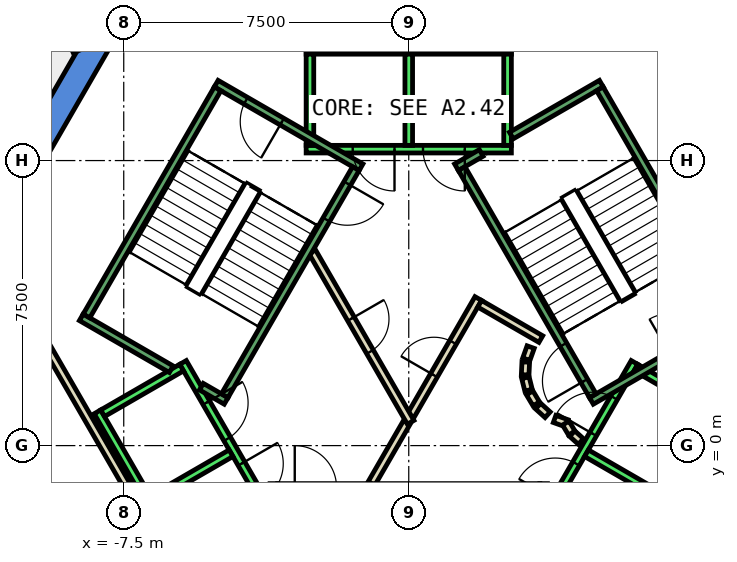
"""IFC4 building model, lengths in metres.
Left out: names, types, materials, properties, quantities, classifications, styles, units other than length and angle.
Written with IfcOpenShell. Run it as: python <this file> out.ifc"""

import sys

from ifc_helpers import new_model, si_unit, direction, frame, frame_2d, origin, place, context, subcontext, project, spatial, polyline, rectangle, outline, extrude, element, fill, save


model = new_model("IFC4")
c1 = context("Model", 3, precision=1e-05, world=origin(), true_north=direction((0.0, 1.0)))
c2 = subcontext(c1, "Body", "Model", "MODEL_VIEW")
j1 = project(units=[si_unit("LENGTHUNIT", "METRE"), si_unit("PLANEANGLEUNIT", "RADIAN")], contexts=[c1])
p1 = place(None, origin())
s1 = spatial("IfcSite", under=j1, at=p1, CompositionType="ELEMENT")
p2 = place(p1, origin())
s2 = spatial("IfcBuilding", under=s1, at=p2, CompositionType="ELEMENT")
p3 = place(p2, frame((0.0, 0.0, 206.6)))
s3 = spatial("IfcBuildingStorey", under=s2, at=p3, CompositionType="ELEMENT", Elevation=206.6)
p4 = place(p3, frame((0.0, 0.0, -0.4)))
e1 = element("IfcWall", 1, at=p4, inside=s3, PredefinedType="SHEAR", context=c2, shape_type="SweptSolid", body=[
    extrude(outline(polyline([(-11.834, 5.002), (-11.228, 4.652), (-6.235, 13.3), (-6.64, 14.0), (-11.834, 5.002)])), origin(), (0.0, 0.0, 1.0), 4.2),
])
p5 = place(p3, frame((0.0, 0.0, -0.4)))
e2 = element("IfcWall", 2, at=p5, inside=s3, PredefinedType="SHEAR", context=c2, shape_type="SweptSolid", body=[
    extrude(outline(polyline([(-13.279, 2.5), (-6.64, -9.0), (-6.235, -8.3), (-12.471, 2.5), (-13.279, 2.5)])), origin(), (0.0, 0.0, 1.0), 4.2),
])
p6 = place(p3, frame((0.0, 0.0, -0.4)))
e3 = element("IfcWall", 3, at=p6, inside=s3, PredefinedType="SHEAR", context=c2, shape_type="SweptSolid", body=[
    extrude(outline(polyline([(6.64, -9.0), (13.279, 2.5), (12.471, 2.5), (6.235, -8.3), (6.64, -9.0)])), origin(), (0.0, 0.0, 1.0), 4.2),
])
p7 = place(p3, frame((-9.47, 12.033, 0.0), z_axis=(0.0, 0.0, 1.0), x_axis=(0.40441741061, -0.914574522931, 0.0)))
e4 = element("IfcWall", 4, at=p7, inside=s3, PredefinedType="PARTITIONING", context=c2, shape_type="SweptSolid", body=[
    extrude(rectangle(XDim=1.817, YDim=0.2, at=frame_2d((0.909, 0.0))), origin(), (0.0, 0.0, 1.0), 3.8),
])
p8 = place(p3, frame((5.751, -3.938, 0.0), z_axis=(0.0, 0.0, 1.0), x_axis=(0.500034260056, 0.866005622828, 0.0)))
e5 = element("IfcWall", 5, at=p8, inside=s3, PredefinedType="PARTITIONING", context=c2, shape_type="SweptSolid", body=[
    extrude(rectangle(XDim=5.399, YDim=0.2, at=frame_2d((2.7, 0.0))), origin(), (0.0, 0.0, 1.0), 3.8),
])
p9 = place(p3, frame((-9.751, 2.99, 0.0), z_axis=(0.0, 0.0, 1.0), x_axis=(0.500012163284, -0.866018381195, 0.0)))
e6 = element("IfcWall", 6, at=p9, inside=s3, PredefinedType="PARTITIONING", context=c2, shape_type="SweptSolid", body=[
    extrude(rectangle(XDim=8.0, YDim=0.2, at=frame_2d((4.0, 0.0))), origin(), (0.0, 0.0, 1.0), 3.8),
])
p10 = place(p3, frame((-0.982, -1.0, 0.0), z_axis=(0.0, 0.0, 1.0), x_axis=(0.50024047865, 0.865886518847, 0.0)))
e7 = element("IfcWall", 7, at=p10, inside=s3, PredefinedType="PARTITIONING", context=c2, shape_type="SweptSolid", body=[
    extrude(rectangle(XDim=1.863, YDim=0.2, at=frame_2d((0.931, 0.0))), origin(), (0.0, 0.0, 1.0), 3.8),
])
p11 = place(p3, frame((0.05, 0.787, 0.0), z_axis=(0.0, 0.0, 1.0), x_axis=(0.499954076797, 0.866051915934, 0.0)))
e8 = element("IfcWall", 8, at=p11, inside=s3, PredefinedType="PARTITIONING", context=c2, shape_type="SweptSolid", body=[
    extrude(rectangle(XDim=3.558, YDim=0.2, at=frame_2d((1.779, 0.0))), origin(), (0.0, 0.0, 1.0), 3.8),
])
p12 = place(p11, frame((1.229, 0.0, 0.0)))
e9 = element("IfcOpeningElement", 9, at=p12, cuts=e8, PredefinedType="OPENING", context=c2, shape_type="SweptSolid", body=[
    extrude(rectangle(XDim=1.0, YDim=2.1, at=frame_2d((0.5, 1.05))), frame((0.0, 0.11, 0.0), z_axis=(0.0, -1.0, 0.0), x_axis=(1.0, 0.0, 0.0)), (0.0, 0.0, 1.0), 0.22),
])
p13 = place(p3, frame((1.866, 3.732, 0.0), z_axis=(0.0, 0.0, 1.0), x_axis=(0.866043361281, -0.499968895414, 0.0)))
e10 = element("IfcWall", 10, at=p13, inside=s3, PredefinedType="PARTITIONING", context=c2, shape_type="SweptSolid", body=[
    extrude(rectangle(XDim=1.858, YDim=0.2, at=frame_2d((0.929, 0.0))), origin(), (0.0, 0.0, 1.0), 3.8),
])
p14 = place(p3, frame((3.208, 2.592, 0.0), z_axis=(0.0, 0.0, 1.0), x_axis=(-0.337388820924, -0.941365382578, 0.0)))
e11 = element("IfcWall", 11, at=p14, inside=s3, PredefinedType="PARTITIONING", context=c2, shape_type="SweptSolid", body=[
    extrude(rectangle(XDim=0.338, YDim=0.2, at=frame_2d((0.169, 0.0))), origin(), (0.0, 0.0, 1.0), 3.8),
])
p15 = place(p3, frame((3.079, 2.199, 0.0), z_axis=(0.0, 0.0, 1.0), x_axis=(-0.047771483479, -0.998858290933, 0.0)))
e12 = element("IfcWall", 12, at=p15, inside=s3, PredefinedType="PARTITIONING", context=c2, shape_type="SweptSolid", body=[
    extrude(rectangle(XDim=0.337, YDim=0.2, at=frame_2d((0.169, 0.0))), origin(), (0.0, 0.0, 1.0), 3.8),
])
p16 = place(p3, frame((3.07, 1.786, 0.0), z_axis=(0.0, 0.0, 1.0), x_axis=(0.242705583207, -0.970099994784, 0.0)))
e13 = element("IfcWall", 13, at=p16, inside=s3, PredefinedType="PARTITIONING", context=c2, shape_type="SweptSolid", body=[
    extrude(rectangle(XDim=0.338, YDim=0.2, at=frame_2d((0.169, 0.0))), origin(), (0.0, 0.0, 1.0), 3.8),
])
for number, where, z_axis, x_axis in (
    (14, (3.182, 1.388, 0.0), (0.0, 0.0, 1.0), (0.512, -0.859, 0.0)),
    (15, (3.404, 1.039, 0.0), (0.0, 0.0, 1.0), (0.74, -0.672, 0.0)),
):
    element("IfcWall", number, at=place(p3, frame(where, z_axis=z_axis, x_axis=x_axis)), inside=s3, PredefinedType="PARTITIONING", context=c2, shape_type="SweptSolid", body=[
        extrude(rectangle(XDim=0.338, YDim=0.2, at=frame_2d((0.169, 0.0))), origin(), (0.0, 0.0, 1.0), 3.8),
    ])
p17 = place(p3, frame((3.838, 0.702, 0.0), z_axis=(0.0, 0.0, 1.0), x_axis=(0.941035081519, -0.338308993895, 0.0)))
e16 = element("IfcWall", 16, at=p17, inside=s3, PredefinedType="PARTITIONING", context=c2, shape_type="SweptSolid", body=[
    extrude(rectangle(XDim=0.337, YDim=0.2, at=frame_2d((0.168, 0.0))), origin(), (0.0, 0.0, 1.0), 3.8),
])
p18 = place(p3, frame((4.132, 0.593, 0.0), z_axis=(0.0, 0.0, 1.0), x_axis=(0.513561617048, -0.858052717201, 0.0)))
e17 = element("IfcWall", 17, at=p18, inside=s3, PredefinedType="PARTITIONING", context=c2, shape_type="SweptSolid", body=[
    extrude(rectangle(XDim=0.308, YDim=0.2, at=frame_2d((0.154, 0.0))), origin(), (0.0, 0.0, 1.0), 3.8),
])
p19 = place(p3, frame((4.301, 0.315, 0.0), z_axis=(0.0, 0.0, 1.0), x_axis=(0.741798017506, -0.670623367639, 0.0)))
e18 = element("IfcWall", 18, at=p19, inside=s3, PredefinedType="PARTITIONING", context=c2, shape_type="SweptSolid", body=[
    extrude(rectangle(XDim=0.309, YDim=0.2, at=frame_2d((0.154, 0.0))), origin(), (0.0, 0.0, 1.0), 3.8),
])
p20 = place(p3, frame((-2.54, 5.1, 0.0), z_axis=(0.0, 0.0, 1.0), x_axis=(0.499925051871, -0.866068670783, 0.0)))
e19 = element("IfcWall", 19, at=p20, inside=s3, PredefinedType="PARTITIONING", context=c2, shape_type="SweptSolid", body=[
    extrude(rectangle(XDim=5.181, YDim=0.2, at=frame_2d((2.59, 0.0))), origin(), (0.0, 0.0, 1.0), 3.8),
])
p21 = place(p20, frame((2.04, 0.0, 0.0)))
e20 = element("IfcOpeningElement", 20, at=p21, cuts=e19, PredefinedType="OPENING", context=c2, shape_type="SweptSolid", body=[
    extrude(rectangle(XDim=1.0, YDim=2.1, at=frame_2d((0.5, 1.05))), frame((0.0, 0.11, 0.0), z_axis=(0.0, -1.0, 0.0), x_axis=(1.0, 0.0, 0.0)), (0.0, 0.0, 1.0), 0.22),
])
p22 = place(p3, frame((2.7, 7.8, 0.0), z_axis=(0.0, 0.0, 1.0), x_axis=(-1.0, 0.0, 0.0)))
e21 = element("IfcWall", 21, at=p22, inside=s3, PredefinedType="STANDARD", context=c2, shape_type="SweptSolid", body=[
    extrude(rectangle(XDim=5.4, YDim=0.2, at=frame_2d((2.7, 0.0))), origin(), (0.0, 0.0, 1.0), 3.8),
])
p23 = place(p22, frame((1.225, 0.0, 0.0)))
e22 = element("IfcOpeningElement", 22, at=p23, cuts=e21, PredefinedType="OPENING", context=c2, shape_type="SweptSolid", body=[
    extrude(rectangle(XDim=1.1, YDim=2.1, at=frame_2d((0.55, 1.05))), frame((0.0, 0.11, 0.0), z_axis=(0.0, -1.0, 0.0), x_axis=(1.0, 0.0, 0.0)), (0.0, 0.0, 1.0), 0.22),
])
p24 = place(p22, frame((3.075, 0.0, 0.0)))
e23 = element("IfcOpeningElement", 23, at=p24, cuts=e21, PredefinedType="OPENING", context=c2, shape_type="SweptSolid", body=[
    extrude(rectangle(XDim=1.1, YDim=2.1, at=frame_2d((0.55, 1.05))), frame((0.0, 0.11, 0.0), z_axis=(0.0, -1.0, 0.0), x_axis=(1.0, 0.0, 0.0)), (0.0, 0.0, 1.0), 0.22),
])
p25 = place(p3, frame((2.7, 10.4, 0.0), z_axis=(0.0, 0.0, 1.0), x_axis=(-1.0, 0.0, 0.0)))
e24 = element("IfcWall", 24, at=p25, inside=s3, PredefinedType="STANDARD", context=c2, shape_type="SweptSolid", body=[
    extrude(rectangle(XDim=5.4, YDim=0.2, at=frame_2d((2.7, 0.0))), origin(), (0.0, 0.0, 1.0), 3.8),
])
for number, where, z_axis, x_axis in (
    (25, (2.6, 7.9, 0.0), (0.0, 0.0, 1.0), (0.0, 1.0, 0.0)),
    (26, (0.0, 7.9, 0.0), (0.0, 0.0, 1.0), (0.0, 1.0, 0.0)),
    (27, (-2.6, 7.9, 0.0), (0.0, 0.0, 1.0), (0.0, 1.0, 0.0)),
):
    element("IfcWall", number, at=place(p3, frame(where, z_axis=z_axis, x_axis=x_axis)), inside=s3, PredefinedType="STANDARD", context=c2, shape_type="SweptSolid", body=[
        extrude(rectangle(XDim=2.4, YDim=0.2, at=frame_2d((1.2, 0.0))), origin(), (0.0, 0.0, 1.0), 3.8),
    ])
p26 = place(p3, frame((-5.94, 2.188, 0.0), z_axis=(0.0, 0.0, 1.0), x_axis=(0.500034260056, -0.866005622828, 0.0)))
e28 = element("IfcWall", 28, at=p26, inside=s3, PredefinedType="STANDARD", context=c2, shape_type="SweptSolid", body=[
    extrude(rectangle(XDim=5.399, YDim=0.2, at=frame_2d((2.7, 0.0))), origin(), (0.0, 0.0, 1.0), 3.8),
])
p27 = place(p26, frame((3.075, 0.0, 0.0)))
e29 = element("IfcOpeningElement", 29, at=p27, cuts=e28, PredefinedType="OPENING", context=c2, shape_type="SweptSolid", body=[
    extrude(rectangle(XDim=1.1, YDim=2.1, at=frame_2d((0.55, 1.05))), frame((0.0, 0.11, 0.0), z_axis=(0.0, -1.0, 0.0), x_axis=(1.0, 0.0, 0.0)), (0.0, 0.0, 1.0), 0.22),
])
p28 = place(p26, frame((1.225, 0.0, 0.0)))
e30 = element("IfcOpeningElement", 30, at=p28, cuts=e28, PredefinedType="OPENING", context=c2, shape_type="SweptSolid", body=[
    extrude(rectangle(XDim=1.1, YDim=2.1, at=frame_2d((0.55, 1.05))), frame((0.0, 0.11, 0.0), z_axis=(0.0, -1.0, 0.0), x_axis=(1.0, 0.0, 0.0)), (0.0, 0.0, 1.0), 0.22),
])
p29 = place(p3, frame((-8.192, 0.888, 0.0), z_axis=(0.0, 0.0, 1.0), x_axis=(0.500034260056, -0.866005622828, 0.0)))
e31 = element("IfcWall", 31, at=p29, inside=s3, PredefinedType="STANDARD", context=c2, shape_type="SweptSolid", body=[
    extrude(rectangle(XDim=5.399, YDim=0.2, at=frame_2d((2.7, 0.0))), origin(), (0.0, 0.0, 1.0), 3.8),
])
for number, where, z_axis, x_axis in (
    (32, (-5.977, 2.052, 0.0), (0.0, 0.0, 1.0), (-0.866, -0.5, 0.0)),
    (33, (-4.677, -0.2, 0.0), (0.0, 0.0, 1.0), (-0.866, -0.5, 0.0)),
):
    element("IfcWall", number, at=place(p3, frame(where, z_axis=z_axis, x_axis=x_axis)), inside=s3, PredefinedType="STANDARD", context=c2, shape_type="SweptSolid", body=[
        extrude(rectangle(XDim=2.399, YDim=0.2, at=frame_2d((1.2, 0.0))), origin(), (0.0, 0.0, 1.0), 3.8),
    ])
p30 = place(p3, frame((3.24, -2.488, 0.0), z_axis=(0.0, 0.0, 1.0), x_axis=(0.500034260056, 0.866005622828, 0.0)))
e34 = element("IfcWall", 34, at=p30, inside=s3, PredefinedType="STANDARD", context=c2, shape_type="SweptSolid", body=[
    extrude(rectangle(XDim=5.399, YDim=0.2, at=frame_2d((2.7, 0.0))), origin(), (0.0, 0.0, 1.0), 3.8),
])
p31 = place(p30, frame((3.225, 0.0, 0.0)))
e35 = element("IfcOpeningElement", 35, at=p31, cuts=e34, PredefinedType="OPENING", context=c2, shape_type="SweptSolid", body=[
    extrude(rectangle(XDim=1.1, YDim=2.1, at=frame_2d((0.55, 1.05))), frame((0.0, 0.11, 0.0), z_axis=(0.0, -1.0, 0.0), x_axis=(1.0, 0.0, 0.0)), (0.0, 0.0, 1.0), 0.22),
])
p32 = place(p30, frame((1.225, 0.0, 0.0)))
e36 = element("IfcOpeningElement", 36, at=p32, cuts=e34, PredefinedType="OPENING", context=c2, shape_type="SweptSolid", body=[
    extrude(rectangle(XDim=1.1, YDim=2.1, at=frame_2d((0.55, 1.05))), frame((0.0, 0.11, 0.0), z_axis=(0.0, -1.0, 0.0), x_axis=(1.0, 0.0, 0.0)), (0.0, 0.0, 1.0), 0.22),
])
p33 = place(p3, frame((5.492, -3.788, 0.0), z_axis=(0.0, 0.0, 1.0), x_axis=(0.500034260056, 0.866005622828, 0.0)))
e37 = element("IfcWall", 37, at=p33, inside=s3, PredefinedType="STANDARD", context=c2, shape_type="SweptSolid", body=[
    extrude(rectangle(XDim=5.399, YDim=0.2, at=frame_2d((2.7, 0.0))), origin(), (0.0, 0.0, 1.0), 3.8),
])
for number, where, z_axis, x_axis in (
    (38, (4.677, -0.2, 0.0), (0.0, 0.0, 1.0), (0.866, -0.5, 0.0)),
    (39, (5.977, 2.052, 0.0), (0.0, 0.0, 1.0), (0.866, -0.5, 0.0)),
):
    element("IfcWall", number, at=place(p3, frame(where, z_axis=z_axis, x_axis=x_axis)), inside=s3, PredefinedType="STANDARD", context=c2, shape_type="SweptSolid", body=[
        extrude(rectangle(XDim=2.399, YDim=0.2, at=frame_2d((1.2, 0.0))), origin(), (0.0, 0.0, 1.0), 3.8),
    ])
p34 = place(p3, frame((4.806, 1.176, 0.0), z_axis=(0.0, 0.0, 1.0), x_axis=(0.866059941101, 0.499940174841, 0.0)))
e40 = element("IfcWall", 40, at=p34, inside=s3, PredefinedType="STANDARD", context=c2, shape_type="SweptSolid", body=[
    extrude(rectangle(XDim=4.4, YDim=0.2, at=frame_2d((2.2, 0.0))), origin(), (0.0, 0.0, 1.0), 3.8),
])
p35 = place(p34, frame((2.4, 0.0, 0.0)))
e41 = element("IfcOpeningElement", 41, at=p35, cuts=e40, PredefinedType="OPENING", context=c2, shape_type="SweptSolid", body=[
    extrude(rectangle(XDim=1.1, YDim=2.2, at=frame_2d((0.55, 1.1))), frame((0.0, 0.11, 0.0), z_axis=(0.0, -1.0, 0.0), x_axis=(1.0, 0.0, 0.0)), (0.0, 0.0, 1.0), 0.22),
])
p36 = place(p3, frame((2.7, 8.158, 0.0), z_axis=(0.0, 0.0, 1.0), x_axis=(0.86611865017, 0.499838457731, 0.0)))
e42 = element("IfcWall", 42, at=p36, inside=s3, PredefinedType="STANDARD", context=c2, shape_type="SweptSolid", body=[
    extrude(rectangle(XDim=2.733, YDim=0.2, at=frame_2d((1.366, 0.0))), origin(), (0.0, 0.0, 1.0), 3.8),
])
p37 = place(p3, frame((1.256, 7.324, 0.0), z_axis=(0.0, 0.0, 1.0), x_axis=(0.865915093549, 0.500191014278, 0.0)))
e43 = element("IfcWall", 43, at=p37, inside=s3, PredefinedType="STANDARD", context=c2, shape_type="SweptSolid", body=[
    extrude(rectangle(XDim=0.752, YDim=0.2, at=frame_2d((0.376, 0.0))), origin(), (0.0, 0.0, 1.0), 3.8),
])
p38 = place(p3, frame((4.843, 1.312, 0.0), z_axis=(0.0, 0.0, 1.0), x_axis=(-0.499963383562, 0.866046543262, 0.0)))
e44 = element("IfcWall", 44, at=p38, inside=s3, PredefinedType="STANDARD", context=c2, shape_type="SweptSolid", body=[
    extrude(rectangle(XDim=6.9, YDim=0.2, at=frame_2d((3.45, 0.0))), origin(), (0.0, 0.0, 1.0), 3.8),
])
p39 = place(p38, frame((0.45, 0.0, 0.0)))
e45 = element("IfcOpeningElement", 45, at=p39, cuts=e44, PredefinedType="OPENING", context=c2, shape_type="SweptSolid", body=[
    extrude(rectangle(XDim=1.1, YDim=2.2, at=frame_2d((0.55, 1.1))), frame((0.0, 0.11, 0.0), z_axis=(0.0, -1.0, 0.0), x_axis=(1.0, 0.0, 0.0)), (0.0, 0.0, 1.0), 0.22),
])
p40 = place(p3, frame((8.48, 3.412, 0.0), z_axis=(0.0, 0.0, 1.0), x_axis=(-0.499978703459, 0.866037698999, 0.0)))
e46 = element("IfcWall", 46, at=p40, inside=s3, PredefinedType="STANDARD", context=c2, shape_type="SweptSolid", body=[
    extrude(rectangle(XDim=6.9, YDim=0.2, at=frame_2d((3.45, 0.0))), origin(), (0.0, 0.0, 1.0), 3.8),
])
p41 = place(p3, frame((-1.256, 7.324, 0.0), z_axis=(0.0, 0.0, 1.0), x_axis=(-0.866046073146, 0.499964197906, 0.0)))
e47 = element("IfcWall", 47, at=p41, inside=s3, PredefinedType="STANDARD", context=c2, shape_type="SweptSolid", body=[
    extrude(rectangle(XDim=4.4, YDim=0.2, at=frame_2d((2.2, 0.0))), origin(), (0.0, 0.0, 1.0), 3.8),
])
p42 = place(p41, frame((2.4, 0.0, 0.0)))
e48 = element("IfcOpeningElement", 48, at=p42, cuts=e47, PredefinedType="OPENING", context=c2, shape_type="SweptSolid", body=[
    extrude(rectangle(XDim=1.1, YDim=2.2, at=frame_2d((0.55, 1.1))), frame((0.0, 0.11, 0.0), z_axis=(0.0, -1.0, 0.0), x_axis=(1.0, 0.0, 0.0)), (0.0, 0.0, 1.0), 0.22),
])
p43 = place(p3, frame((-6.25, 2.01, 0.0), z_axis=(0.0, 0.0, 1.0), x_axis=(-0.86611865017, 0.499838457731, 0.0)))
e49 = element("IfcWall", 49, at=p43, inside=s3, PredefinedType="STANDARD", context=c2, shape_type="SweptSolid", body=[
    extrude(rectangle(XDim=2.733, YDim=0.2, at=frame_2d((1.366, 0.0))), origin(), (0.0, 0.0, 1.0), 3.8),
])
p44 = place(p3, frame((-4.806, 1.176, 0.0), z_axis=(0.0, 0.0, 1.0), x_axis=(-0.866558586415, 0.499075361355, 0.0)))
e50 = element("IfcWall", 50, at=p44, inside=s3, PredefinedType="STANDARD", context=c2, shape_type="SweptSolid", body=[
    extrude(rectangle(XDim=0.751, YDim=0.2, at=frame_2d((0.376, 0.0))), origin(), (0.0, 0.0, 1.0), 3.8),
])
p45 = place(p3, frame((-1.393, 7.288, 0.0), z_axis=(0.0, 0.0, 1.0), x_axis=(-0.499963383562, -0.866046543262, 0.0)))
e51 = element("IfcWall", 51, at=p45, inside=s3, PredefinedType="STANDARD", context=c2, shape_type="SweptSolid", body=[
    extrude(rectangle(XDim=6.9, YDim=0.2, at=frame_2d((3.45, 0.0))), origin(), (0.0, 0.0, 1.0), 3.8),
])
p46 = place(p45, frame((0.45, 0.0, 0.0)))
e52 = element("IfcOpeningElement", 52, at=p46, cuts=e51, PredefinedType="OPENING", context=c2, shape_type="SweptSolid", body=[
    extrude(rectangle(XDim=1.1, YDim=2.2, at=frame_2d((0.55, 1.1))), frame((0.0, 0.11, 0.0), z_axis=(0.0, -1.0, 0.0), x_axis=(1.0, 0.0, 0.0)), (0.0, 0.0, 1.0), 0.22),
])
p47 = place(p3, frame((-5.03, 9.388, 0.0), z_axis=(0.0, 0.0, 1.0), x_axis=(-0.499978703459, -0.866037698999, 0.0)))
e53 = element("IfcWall", 53, at=p47, inside=s3, PredefinedType="STANDARD", context=c2, shape_type="SweptSolid", body=[
    extrude(rectangle(XDim=6.9, YDim=0.2, at=frame_2d((3.45, 0.0))), origin(), (0.0, 0.0, 1.0), 3.8),
])
p48 = place(p12, origin())
e54 = element("IfcDoor", 54, at=p48, inside=s3, OperationType="SINGLE_SWING_RIGHT", PredefinedType="DOOR", context=c2, shape_type="SweptSolid", body=[
    extrude(rectangle(XDim=1.0, YDim=2.1, at=frame_2d((0.5, 1.05))), frame((0.0, 0.025, 0.0), z_axis=(0.0, -1.0, 0.0), x_axis=(1.0, 0.0, 0.0)), (0.0, 0.0, 1.0), 0.05),
])
fill(e9, e54)
p49 = place(p21, origin())
e55 = element("IfcDoor", 55, at=p49, inside=s3, OperationType="SINGLE_SWING_RIGHT", PredefinedType="DOOR", context=c2, shape_type="SweptSolid", body=[
    extrude(rectangle(XDim=1.0, YDim=2.1, at=frame_2d((0.5, 1.05))), frame((0.0, 0.025, 0.0), z_axis=(0.0, -1.0, 0.0), x_axis=(1.0, 0.0, 0.0)), (0.0, 0.0, 1.0), 0.05),
])
fill(e20, e55)
p50 = place(p23, origin())
e56 = element("IfcDoor", 56, at=p50, inside=s3, OperationType="SLIDING_TO_LEFT", PredefinedType="DOOR", context=c2, shape_type="SweptSolid", body=[
    extrude(rectangle(XDim=1.1, YDim=2.1, at=frame_2d((0.55, 1.05))), frame((0.0, 0.025, 0.0), z_axis=(0.0, -1.0, 0.0), x_axis=(1.0, 0.0, 0.0)), (0.0, 0.0, 1.0), 0.05),
])
fill(e22, e56)
p51 = place(p24, origin())
e57 = element("IfcDoor", 57, at=p51, inside=s3, OperationType="SLIDING_TO_LEFT", PredefinedType="DOOR", context=c2, shape_type="SweptSolid", body=[
    extrude(rectangle(XDim=1.1, YDim=2.1, at=frame_2d((0.55, 1.05))), frame((0.0, 0.025, 0.0), z_axis=(0.0, -1.0, 0.0), x_axis=(1.0, 0.0, 0.0)), (0.0, 0.0, 1.0), 0.05),
])
fill(e23, e57)
p52 = place(p31, origin())
e58 = element("IfcDoor", 58, at=p52, inside=s3, OperationType="SLIDING_TO_LEFT", PredefinedType="DOOR", context=c2, shape_type="SweptSolid", body=[
    extrude(rectangle(XDim=1.1, YDim=2.1, at=frame_2d((0.55, 1.05))), frame((0.0, 0.025, 0.0), z_axis=(0.0, -1.0, 0.0), x_axis=(1.0, 0.0, 0.0)), (0.0, 0.0, 1.0), 0.05),
])
fill(e35, e58)
p53 = place(p27, origin())
e59 = element("IfcDoor", 59, at=p53, inside=s3, OperationType="SLIDING_TO_LEFT", PredefinedType="DOOR", context=c2, shape_type="SweptSolid", body=[
    extrude(rectangle(XDim=1.1, YDim=2.1, at=frame_2d((0.55, 1.05))), frame((0.0, 0.025, 0.0), z_axis=(0.0, -1.0, 0.0), x_axis=(1.0, 0.0, 0.0)), (0.0, 0.0, 1.0), 0.05),
])
fill(e29, e59)
p54 = place(p32, origin())
e60 = element("IfcDoor", 60, at=p54, inside=s3, OperationType="SLIDING_TO_LEFT", PredefinedType="DOOR", context=c2, shape_type="SweptSolid", body=[
    extrude(rectangle(XDim=1.1, YDim=2.1, at=frame_2d((0.55, 1.05))), frame((0.0, 0.025, 0.0), z_axis=(0.0, -1.0, 0.0), x_axis=(1.0, 0.0, 0.0)), (0.0, 0.0, 1.0), 0.05),
])
fill(e36, e60)
p55 = place(p28, origin())
e61 = element("IfcDoor", 61, at=p55, inside=s3, OperationType="SLIDING_TO_LEFT", PredefinedType="DOOR", context=c2, shape_type="SweptSolid", body=[
    extrude(rectangle(XDim=1.1, YDim=2.1, at=frame_2d((0.55, 1.05))), frame((0.0, 0.025, 0.0), z_axis=(0.0, -1.0, 0.0), x_axis=(1.0, 0.0, 0.0)), (0.0, 0.0, 1.0), 0.05),
])
fill(e30, e61)
p56 = place(p39, origin())
e62 = element("IfcDoor", 62, at=p56, inside=s3, OperationType="SINGLE_SWING_LEFT", PredefinedType="DOOR", context=c2, shape_type="SweptSolid", body=[
    extrude(rectangle(XDim=1.1, YDim=2.2, at=frame_2d((0.55, 1.1))), frame((0.0, 0.025, 0.0), z_axis=(0.0, -1.0, 0.0), x_axis=(1.0, 0.0, 0.0)), (0.0, 0.0, 1.0), 0.05),
])
fill(e45, e62)
p57 = place(p46, origin())
e63 = element("IfcDoor", 63, at=p57, inside=s3, OperationType="SINGLE_SWING_LEFT", PredefinedType="DOOR", context=c2, shape_type="SweptSolid", body=[
    extrude(rectangle(XDim=1.1, YDim=2.2, at=frame_2d((0.55, 1.1))), frame((0.0, 0.025, 0.0), z_axis=(0.0, -1.0, 0.0), x_axis=(1.0, 0.0, 0.0)), (0.0, 0.0, 1.0), 0.05),
])
fill(e52, e63)
p58 = place(p42, origin())
e64 = element("IfcDoor", 64, at=p58, inside=s3, OperationType="SINGLE_SWING_LEFT", PredefinedType="DOOR", context=c2, shape_type="SweptSolid", body=[
    extrude(rectangle(XDim=1.1, YDim=2.2, at=frame_2d((0.55, 1.1))), frame((0.0, 0.025, 0.0), z_axis=(0.0, -1.0, 0.0), x_axis=(1.0, 0.0, 0.0)), (0.0, 0.0, 1.0), 0.05),
])
fill(e48, e64)
save(model, sys.argv[1])
